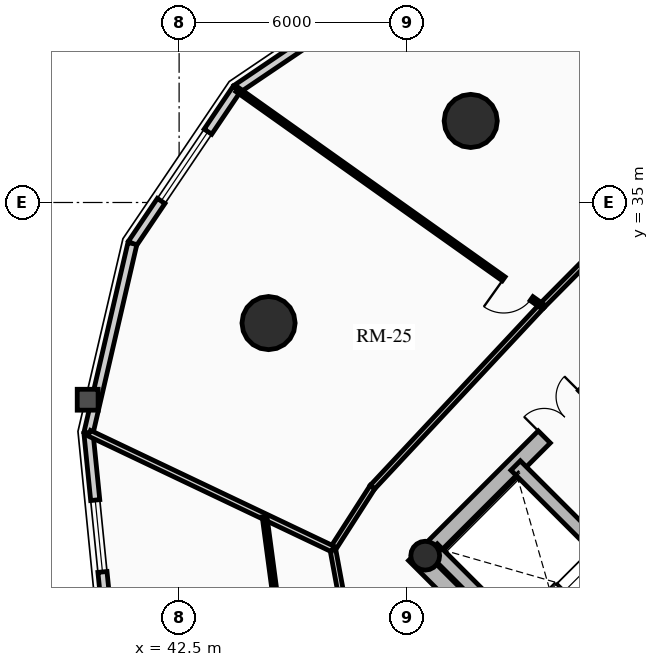
"""IFC4 building model, lengths in metres.
Left out: names, types, materials, properties, quantities, classifications, styles, units other than length and angle.
Written with IfcOpenShell. Run it as: python <this file> out.ifc"""

import sys

from ifc_helpers import new_model, si_unit, direction, frame, frame_2d, origin, origin_2d, place, context, subcontext, project, spatial, rectangle, circle, hollow_circle, extrude, source, transform, mapped, element, fill, save


model = new_model("IFC4")
c1 = context("Model", 3, precision=1e-05, world=origin(), true_north=direction((0.0, 1.0)))
c2 = subcontext(c1, "Body", "Model", "MODEL_VIEW")
j1 = project(units=[si_unit("LENGTHUNIT", "METRE"), si_unit("PLANEANGLEUNIT", "RADIAN")], contexts=[c1])
p1 = place(None, origin())
s1 = spatial("IfcSite", under=j1, at=p1, CompositionType="ELEMENT")
p2 = place(p1, origin())
s2 = spatial("IfcBuilding", under=s1, at=p2, CompositionType="ELEMENT")
p3 = place(p2, frame((0.0, 0.0, 116.71)))
s3 = spatial("IfcBuildingStorey", under=s2, at=p3, CompositionType="ELEMENT", Elevation=116.71)
p4 = place(p3, frame((58.737, 15.697, 0.0), z_axis=(0.0, 0.0, 1.0), x_axis=(-0.707106781187, 0.707106781187, 0.0)))
e1 = element("IfcWall", 1, at=p4, inside=s3, PredefinedType="SHEAR", context=c2, shape_type="SweptSolid", body=[
    extrude(rectangle(XDim=14.2, YDim=0.45, at=frame_2d((7.1, 0.0))), origin(), (0.0, 0.0, 1.0), 2.91),
])
p5 = place(p3, frame((48.856, 25.578, 0.0), z_axis=(0.0, 0.0, 1.0), x_axis=(0.707106781187, 0.707106781187, 0.0)))
e2 = element("IfcWall", 2, at=p5, inside=s3, PredefinedType="SHEAR", context=c2, shape_type="SweptSolid", body=[
    extrude(rectangle(XDim=10.7, YDim=0.45, at=frame_2d((5.35, 0.0))), origin(), (0.0, 0.0, 1.0), 2.91),
])
m1 = source(origin(), c2, "Body", "SweptSolid", [
    extrude(rectangle(XDim=1.5, YDim=2.02, at=frame_2d((0.75, 1.01))), frame((0.0, 0.235, 0.0), z_axis=(0.0, -1.0, 0.0), x_axis=(1.0, 0.0, 0.0)), (0.0, 0.0, 1.0), 0.47),
])
p6 = place(p5, frame((4.6, 0.0, 0.0)))
e3 = element("IfcOpeningElement", 3, at=p6, cuts=e2, PredefinedType="OPENING", context=c2, shape_type="MappedRepresentation", body=[
    mapped(m1, transform((0.0, 0.0, 0.0), x_axis=(1.0, 0.0, 0.0), y_axis=(0.0, 1.0, 0.0), z_axis=(0.0, 0.0, 1.0), scale=1.0)),
])
p7 = place(p3, frame((61.078, 18.355, 0.0), z_axis=(0.0, 0.0, 1.0), x_axis=(-0.707106781187, 0.707106781187, 0.0)))
e4 = element("IfcWall", 4, at=p7, inside=s3, PredefinedType="SHEAR", context=c2, shape_type="SweptSolid", body=[
    extrude(rectangle(XDim=13.75, YDim=0.35, at=frame_2d((6.875, 0.0))), origin(), (0.0, 0.0, 1.0), 2.91),
])
m2 = source(origin(), c2, "Body", "SweptSolid", [
    extrude(rectangle(XDim=1.1, YDim=2.015, at=frame_2d((0.55, 1.007))), frame((0.0, 0.185, 0.0), z_axis=(0.0, -1.0, 0.0), x_axis=(1.0, 0.0, 0.0)), (0.0, 0.0, 1.0), 0.37),
])
p8 = place(p7, frame((4.875, 0.0, 0.0)))
e5 = element("IfcOpeningElement", 5, at=p8, cuts=e4, PredefinedType="OPENING", context=c2, shape_type="MappedRepresentation", body=[
    mapped(m2, transform((0.0, 0.0, 0.0), x_axis=(1.0, 0.0, 0.0), y_axis=(0.0, 1.0, 0.0), z_axis=(0.0, 0.0, 1.0), scale=1.0)),
])
m3 = source(origin(), c2, "Body", "SweptSolid", [
    extrude(rectangle(XDim=1.15, YDim=2.02, at=frame_2d((0.575, 1.01))), frame((0.0, 0.185, 0.0), z_axis=(0.0, -1.0, 0.0), x_axis=(1.0, 0.0, 0.0)), (0.0, 0.0, 1.0), 0.37),
])
p9 = place(p7, frame((7.295, 0.0, 0.0)))
e6 = element("IfcOpeningElement", 6, at=p9, cuts=e4, PredefinedType="OPENING", context=c2, shape_type="MappedRepresentation", body=[
    mapped(m3, transform((0.0, 0.0, 0.0), x_axis=(1.0, 0.0, 0.0), y_axis=(0.0, 1.0, 0.0), z_axis=(0.0, 0.0, 1.0), scale=1.0)),
])
p10 = place(p3, frame((53.922, 21.141, 0.0), z_axis=(0.0, 0.0, 1.0), x_axis=(-0.707088616009, 0.707124945897, 0.0)))
e7 = element("IfcWall", 7, at=p10, inside=s3, PredefinedType="SHEAR", context=c2, shape_type="SweptSolid", body=[
    extrude(rectangle(XDim=6.72, YDim=0.35, at=frame_2d((3.36, 0.0))), origin(), (0.0, 0.0, 1.0), 2.91),
])
p11 = place(p3, frame((48.976, 25.706, 0.0), z_axis=(0.0, 0.0, 1.0), x_axis=(0.707106781187, 0.707106781187, 0.0)))
e8 = element("IfcColumn", 8, at=p11, inside=s3, PredefinedType="COLUMN", context=c2, shape_type="SweptSolid", body=[
    extrude(hollow_circle(Radius=0.38, WallThickness=0.032, at=origin_2d()), origin(), (0.0, 0.0, 1.0), 2.91),
])
for number, where, z_axis, x_axis in (
    (9, (50.173, 37.146, 0.0), (0.0, 0.0, 1.0), (1.0, 0.0, 0.0)),
    (10, (44.854, 31.827, 0.0), (0.0, 0.0, 1.0), (1.0, 0.0, 0.0)),
):
    element("IfcColumn", number, at=place(p3, frame(where, z_axis=z_axis, x_axis=x_axis)), inside=s3, PredefinedType="USERDEFINED", context=c2, shape_type="SweptSolid", body=[
        extrude(circle(Radius=0.7, at=origin_2d()), origin(), (0.0, 0.0, 1.0), 2.91),
    ])
p12 = place(p3, frame((44.015, 37.985, 0.0), z_axis=(0.0, 0.0, 1.0), x_axis=(0.828781148131, 0.559572880421, 0.0)))
e11 = element("IfcWall", 11, at=p12, inside=s3, PredefinedType="SOLIDWALL", context=c2, shape_type="SweptSolid", body=[
    extrude(rectangle(XDim=4.905, YDim=0.24, at=frame_2d((2.452, 0.0))), origin(), (0.0, 0.0, 1.0), 2.179),
])
p13 = place(p3, frame((41.271, 33.92, 0.0), z_axis=(0.0, 0.0, 1.0), x_axis=(0.559572880421, 0.828781148131, 0.0)))
e12 = element("IfcWall", 12, at=p13, inside=s3, PredefinedType="SOLIDWALL", context=c2, shape_type="SweptSolid", body=[
    extrude(rectangle(XDim=4.905, YDim=0.24, at=frame_2d((2.452, 0.0))), origin(), (0.0, 0.0, 1.0), 2.179),
])
m4 = source(origin(), c2, "Body", "SweptSolid", [
    extrude(rectangle(XDim=2.2, YDim=1.35, at=frame_2d((1.1, 0.675))), frame((0.0, 0.13, 0.0), z_axis=(0.0, -1.0, 0.0), x_axis=(1.0, 0.0, 0.0)), (0.0, 0.0, 1.0), 0.26),
])
p14 = place(p13, frame((1.352, 0.0, 0.65)))
e13 = element("IfcOpeningElement", 13, at=p14, cuts=e12, PredefinedType="OPENING", context=c2, shape_type="MappedRepresentation", body=[
    mapped(m4, transform((0.0, 0.0, 0.0), x_axis=(1.0, 0.0, 0.0), y_axis=(0.0, 1.0, 0.0), z_axis=(0.0, 0.0, 1.0), scale=1.0)),
])
p15 = place(p3, frame((40.115, 28.933, 0.0), z_axis=(0.0, 0.0, 1.0), x_axis=(0.225834725257, 0.974165631126, 0.0)))
e14 = element("IfcWall", 14, at=p15, inside=s3, PredefinedType="SOLIDWALL", context=c2, shape_type="SweptSolid", body=[
    extrude(rectangle(XDim=5.119, YDim=0.24, at=frame_2d((2.56, 0.0))), origin(), (0.0, 0.0, 1.0), 2.179),
])
p16 = place(p3, frame((40.661, 23.513, 0.0), z_axis=(0.0, 0.0, 1.0), x_axis=(-0.10015591906, 0.994971754311, 0.0)))
e15 = element("IfcWall", 15, at=p16, inside=s3, PredefinedType="SOLIDWALL", context=c2, shape_type="SweptSolid", body=[
    extrude(rectangle(XDim=5.448, YDim=0.24, at=frame_2d((2.724, 0.0))), origin(), (0.0, 0.0, 1.0), 2.179),
])
m5 = source(origin(), c2, "Body", "SweptSolid", [
    extrude(rectangle(XDim=1.9, YDim=1.35, at=frame_2d((0.95, 0.675))), frame((0.0, 0.13, 0.0), z_axis=(0.0, -1.0, 0.0), x_axis=(1.0, 0.0, 0.0)), (0.0, 0.0, 1.0), 0.26),
])
p17 = place(p16, frame((1.774, 0.0, 0.65)))
e16 = element("IfcOpeningElement", 16, at=p17, cuts=e15, PredefinedType="OPENING", context=c2, shape_type="MappedRepresentation", body=[
    mapped(m5, transform((0.0, 0.0, 0.0), x_axis=(1.0, 0.0, 0.0), y_axis=(0.0, 1.0, 0.0), z_axis=(0.0, 0.0, 1.0), scale=1.0)),
])
p18 = place(p3, frame((54.427, 34.683, 0.0), z_axis=(0.0, 0.0, 1.0), x_axis=(-0.704178989986, -0.710022499687, 0.0)))
e17 = element("IfcWall", 17, at=p18, inside=s3, PredefinedType="PARTITIONING", context=c2, shape_type="SweptSolid", body=[
    extrude(rectangle(XDim=3.384, YDim=0.15, at=frame_2d((1.692, 0.0))), origin(), (0.0, 0.0, 1.0), 2.225),
])
p19 = place(p3, frame((52.043, 32.28, 0.0), z_axis=(0.0, 0.0, 1.0), x_axis=(-0.682606081633, -0.730786519661, 0.0)))
e18 = element("IfcWall", 18, at=p19, inside=s3, PredefinedType="PARTITIONING", context=c2, shape_type="SweptSolid", body=[
    extrude(rectangle(XDim=6.527, YDim=0.15, at=frame_2d((3.263, 0.0))), origin(), (0.0, 0.0, 1.0), 2.225),
])
p20 = place(p3, frame((47.588, 27.51, 0.0), z_axis=(0.0, 0.0, 1.0), x_axis=(-0.540202619347, -0.841534984449, 0.0)))
e19 = element("IfcWall", 19, at=p20, inside=s3, PredefinedType="PARTITIONING", context=c2, shape_type="SweptSolid", body=[
    extrude(rectangle(XDim=1.935, YDim=0.15, at=frame_2d((0.967, 0.0))), origin(), (0.0, 0.0, 1.0), 2.225),
])
p21 = place(p3, frame((46.543, 25.882, 0.0), z_axis=(0.0, 0.0, 1.0), x_axis=(0.181153502579, -0.983454832976, 0.0)))
e20 = element("IfcWall", 20, at=p21, inside=s3, PredefinedType="PARTITIONING", context=c2, shape_type="SweptSolid", body=[
    extrude(rectangle(XDim=1.392, YDim=0.15, at=frame_2d((0.696, 0.0))), origin(), (0.0, 0.0, 1.0), 2.225),
])
p22 = place(p3, frame((55.984, 35.035, 0.0), z_axis=(0.0, 0.0, 1.0), x_axis=(-0.392438685048, 0.919778168081, 0.0)))
e21 = element("IfcWall", 21, at=p22, inside=s3, PredefinedType="PARTITIONING", context=c2, shape_type="SweptSolid", body=[
    extrude(rectangle(XDim=7.426, YDim=0.16, at=frame_2d((3.713, 0.0))), origin(), (0.0, 0.0, 1.0), 2.179),
])
p23 = place(p3, frame((46.543, 25.882, 0.0), z_axis=(0.0, 0.0, 1.0), x_axis=(-0.903054383171, 0.429526228576, 0.0)))
e22 = element("IfcWall", 22, at=p23, inside=s3, PredefinedType="PARTITIONING", context=c2, shape_type="SweptSolid", body=[
    extrude(rectangle(XDim=7.096, YDim=0.16, at=frame_2d((3.548, 0.0))), origin(), (0.0, 0.0, 1.0), 2.179),
])
p24 = place(p3, frame((52.043, 32.28, 0.0), z_axis=(0.0, 0.0, 1.0), x_axis=(-0.81534487613, 0.578975589268, 0.0)))
e23 = element("IfcWall", 23, at=p24, inside=s3, PredefinedType="PARTITIONING", context=c2, shape_type="SweptSolid", body=[
    extrude(rectangle(XDim=9.829, YDim=0.125, at=frame_2d((4.915, 0.0))), origin(), (0.0, 0.0, 1.0), 2.179),
])
m6 = source(origin(), c2, "Body", "SweptSolid", [
    extrude(rectangle(XDim=0.9, YDim=2.005, at=frame_2d((0.45, 1.002))), frame((0.0, 0.073, 0.0), z_axis=(0.0, -1.0, 0.0), x_axis=(1.0, 0.0, 0.0)), (0.0, 0.0, 1.0), 0.145),
])
p25 = place(p24, frame((0.33, 0.0, 0.0)))
e24 = element("IfcOpeningElement", 24, at=p25, cuts=e23, PredefinedType="OPENING", context=c2, shape_type="MappedRepresentation", body=[
    mapped(m6, transform((0.0, 0.0, 0.0), x_axis=(1.0, 0.0, 0.0), y_axis=(0.0, 1.0, 0.0), z_axis=(0.0, 0.0, 1.0), scale=1.0)),
])
p26 = place(p3, frame((44.749, 26.736, 0.0), z_axis=(0.0, 0.0, 1.0), x_axis=(0.132518524874, -0.991180528746, 0.0)))
e25 = element("IfcWall", 25, at=p26, inside=s3, PredefinedType="PARTITIONING", context=c2, shape_type="SweptSolid", body=[
    extrude(rectangle(XDim=2.524, YDim=0.125, at=frame_2d((1.262, 0.0))), origin(), (0.0, 0.0, 1.0), 2.179),
])
m7 = source(origin(), c2, "Body", "SweptSolid", [
    extrude(rectangle(XDim=2.2, YDim=1.35, at=frame_2d((1.1, 0.675))), frame((0.0, 0.03, 0.0), z_axis=(0.0, -1.0, 0.0), x_axis=(1.0, 0.0, 0.0)), (0.0, 0.0, 1.0), 0.06),
])
p27 = place(p14, origin())
e26 = element("IfcWindow", 26, at=p27, inside=s3, PartitioningType="DOUBLE_PANEL_VERTICAL", PredefinedType="WINDOW", context=c2, shape_type="MappedRepresentation", body=[
    mapped(m7, transform((0.0, 0.0, 0.0), x_axis=(1.0, 0.0, 0.0), y_axis=(0.0, 1.0, 0.0), z_axis=(0.0, 0.0, 1.0), scale=1.0)),
])
fill(e13, e26)
m8 = source(origin(), c2, "Body", "SweptSolid", [
    extrude(rectangle(XDim=1.9, YDim=1.35, at=frame_2d((0.95, 0.675))), frame((0.0, 0.03, 0.0), z_axis=(0.0, -1.0, 0.0), x_axis=(1.0, 0.0, 0.0)), (0.0, 0.0, 1.0), 0.06),
])
p28 = place(p17, origin())
e27 = element("IfcWindow", 27, at=p28, inside=s3, PartitioningType="DOUBLE_PANEL_VERTICAL", PredefinedType="WINDOW", context=c2, shape_type="MappedRepresentation", body=[
    mapped(m8, transform((0.0, 0.0, 0.0), x_axis=(1.0, 0.0, 0.0), y_axis=(0.0, 1.0, 0.0), z_axis=(0.0, 0.0, 1.0), scale=1.0)),
])
fill(e16, e27)
m9 = source(origin(), c2, "Body", "SweptSolid", [
    extrude(rectangle(XDim=1.5, YDim=2.02, at=frame_2d((0.75, 1.01))), frame((0.0, 0.025, 0.0), z_axis=(0.0, -1.0, 0.0), x_axis=(1.0, 0.0, 0.0)), (0.0, 0.0, 1.0), 0.05),
])
p29 = place(p6, origin())
e28 = element("IfcDoor", 28, at=p29, inside=s3, OperationType="DOUBLE_DOOR_SINGLE_SWING", PredefinedType="DOOR", context=c2, shape_type="MappedRepresentation", body=[
    mapped(m9, transform((0.0, 0.0, 0.0), x_axis=(1.0, 0.0, 0.0), y_axis=(0.0, 1.0, 0.0), z_axis=(0.0, 0.0, 1.0), scale=1.0)),
])
fill(e3, e28)
m10 = source(origin(), c2, "Body", "SweptSolid", [
    extrude(rectangle(XDim=0.9, YDim=2.005, at=frame_2d((0.45, 1.002))), frame((0.0, 0.025, 0.0), z_axis=(0.0, -1.0, 0.0), x_axis=(1.0, 0.0, 0.0)), (0.0, 0.0, 1.0), 0.05),
])
p30 = place(p25, origin())
e29 = element("IfcDoor", 29, at=p30, inside=s3, OperationType="SINGLE_SWING_RIGHT", PredefinedType="DOOR", context=c2, shape_type="MappedRepresentation", body=[
    mapped(m10, transform((0.0, 0.0, 0.0), x_axis=(1.0, 0.0, 0.0), y_axis=(0.0, 1.0, 0.0), z_axis=(0.0, 0.0, 1.0), scale=1.0)),
])
fill(e24, e29)
save(model, sys.argv[1])
